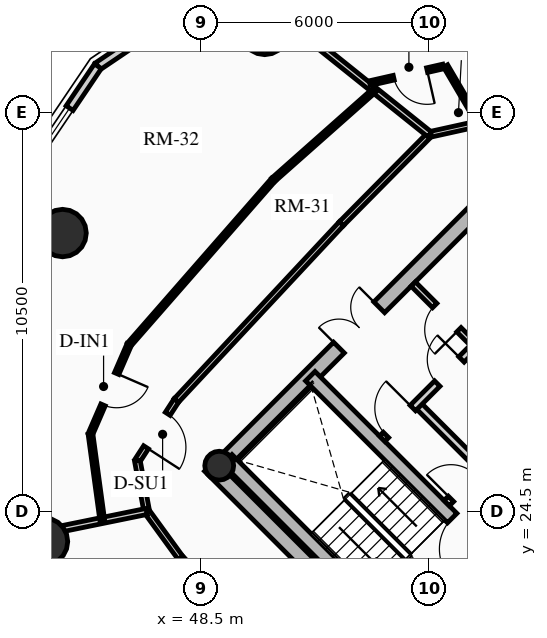
"""IFC4 building model, lengths in metres.
Left out: names, types, materials, properties, quantities, classifications, styles, units other than length and angle.
Written with IfcOpenShell. Run it as: python <this file> out.ifc"""

import sys

from ifc_helpers import new_model, si_unit, direction, frame, frame_2d, origin, origin_2d, place, context, subcontext, project, spatial, rectangle, circle, hollow_circle, extrude, source, transform, mapped, element, fill, save


model = new_model("IFC4")
c1 = context("Model", 3, precision=1e-05, world=origin(), true_north=direction((0.0, 1.0)))
c2 = subcontext(c1, "Body", "Model", "MODEL_VIEW")
j1 = project(units=[si_unit("LENGTHUNIT", "METRE"), si_unit("PLANEANGLEUNIT", "RADIAN")], contexts=[c1])
p1 = place(None, origin())
s1 = spatial("IfcSite", under=j1, at=p1, CompositionType="ELEMENT")
p2 = place(p1, origin())
s2 = spatial("IfcBuilding", under=s1, at=p2, CompositionType="ELEMENT")
p3 = place(p2, frame((0.0, 0.0, 174.88)))
s3 = spatial("IfcBuildingStorey", under=s2, at=p3, CompositionType="ELEMENT", Elevation=174.88)
p4 = place(p3, frame((58.702, 15.732, 0.0), z_axis=(0.0, 0.0, 1.0), x_axis=(-0.707106781187, 0.707106781187, 0.0)))
e1 = element("IfcWall", 1, at=p4, inside=s3, PredefinedType="SHEAR", context=c2, shape_type="SweptSolid", body=[
    extrude(rectangle(XDim=14.1, YDim=0.4, at=frame_2d((7.05, 0.0))), origin(), (0.0, 0.0, 1.0), 2.91),
])
p5 = place(p3, frame((48.873, 25.561, 0.0), z_axis=(0.0, 0.0, 1.0), x_axis=(0.707106781187, 0.707106781187, 0.0)))
e2 = element("IfcWall", 2, at=p5, inside=s3, PredefinedType="SHEAR", context=c2, shape_type="SweptSolid", body=[
    extrude(rectangle(XDim=10.7, YDim=0.4, at=frame_2d((5.35, 0.0))), origin(), (0.0, 0.0, 1.0), 2.91),
])
m1 = source(origin(), c2, "Body", "SweptSolid", [
    extrude(rectangle(XDim=1.5, YDim=2.02, at=frame_2d((0.75, 1.01))), frame((0.0, 0.21, 0.0), z_axis=(0.0, -1.0, 0.0), x_axis=(1.0, 0.0, 0.0)), (0.0, 0.0, 1.0), 0.42),
])
p6 = place(p5, frame((4.6, 0.0, 0.0)))
e3 = element("IfcOpeningElement", 3, at=p6, cuts=e2, PredefinedType="OPENING", context=c2, shape_type="MappedRepresentation", body=[
    mapped(m1, transform((0.0, 0.0, 0.0), x_axis=(1.0, 0.0, 0.0), y_axis=(0.0, 1.0, 0.0), z_axis=(0.0, 0.0, 1.0), scale=1.0)),
])
p7 = place(p3, frame((61.06, 18.373, 0.0), z_axis=(0.0, 0.0, 1.0), x_axis=(-0.707106781187, 0.707106781187, 0.0)))
e4 = element("IfcWall", 4, at=p7, inside=s3, PredefinedType="SHEAR", context=c2, shape_type="SweptSolid", body=[
    extrude(rectangle(XDim=13.7, YDim=0.35, at=frame_2d((6.85, 0.0))), origin(), (0.0, 0.0, 1.0), 2.91),
])
m2 = source(origin(), c2, "Body", "SweptSolid", [
    extrude(rectangle(XDim=1.1, YDim=2.015, at=frame_2d((0.55, 1.007))), frame((0.0, 0.185, 0.0), z_axis=(0.0, -1.0, 0.0), x_axis=(1.0, 0.0, 0.0)), (0.0, 0.0, 1.0), 0.37),
])
p8 = place(p7, frame((4.85, 0.0, 0.0)))
e5 = element("IfcOpeningElement", 5, at=p8, cuts=e4, PredefinedType="OPENING", context=c2, shape_type="MappedRepresentation", body=[
    mapped(m2, transform((0.0, 0.0, 0.0), x_axis=(1.0, 0.0, 0.0), y_axis=(0.0, 1.0, 0.0), z_axis=(0.0, 0.0, 1.0), scale=1.0)),
])
p9 = place(p7, frame((0.625, 0.0, 0.0)))
e6 = element("IfcOpeningElement", 6, at=p9, cuts=e4, PredefinedType="OPENING", context=c2, shape_type="MappedRepresentation", body=[
    mapped(m2, transform((0.0, 0.0, 0.0), x_axis=(1.0, 0.0, 0.0), y_axis=(0.0, 1.0, 0.0), z_axis=(0.0, 0.0, 1.0), scale=1.0)),
])
p10 = place(p7, frame((2.625, 0.0, 0.0)))
e7 = element("IfcOpeningElement", 7, at=p10, cuts=e4, PredefinedType="OPENING", context=c2, shape_type="MappedRepresentation", body=[
    mapped(m2, transform((0.0, 0.0, 0.0), x_axis=(1.0, 0.0, 0.0), y_axis=(0.0, 1.0, 0.0), z_axis=(0.0, 0.0, 1.0), scale=1.0)),
])
m3 = source(origin(), c2, "Body", "SweptSolid", [
    extrude(rectangle(XDim=1.15, YDim=2.02, at=frame_2d((0.575, 1.01))), frame((0.0, 0.185, 0.0), z_axis=(0.0, -1.0, 0.0), x_axis=(1.0, 0.0, 0.0)), (0.0, 0.0, 1.0), 0.37),
])
p11 = place(p7, frame((7.27, 0.0, 0.0)))
e8 = element("IfcOpeningElement", 8, at=p11, cuts=e4, PredefinedType="OPENING", context=c2, shape_type="MappedRepresentation", body=[
    mapped(m3, transform((0.0, 0.0, 0.0), x_axis=(1.0, 0.0, 0.0), y_axis=(0.0, 1.0, 0.0), z_axis=(0.0, 0.0, 1.0), scale=1.0)),
])
p12 = place(p3, frame((53.922, 21.141, 0.0), z_axis=(0.0, 0.0, 1.0), x_axis=(-0.707106781187, 0.707106781187, 0.0)))
e9 = element("IfcWall", 9, at=p12, inside=s3, PredefinedType="SHEAR", context=c2, shape_type="SweptSolid", body=[
    extrude(rectangle(XDim=6.695, YDim=0.35, at=frame_2d((3.348, 0.0))), origin(), (0.0, 0.0, 1.0), 2.91),
])
p13 = place(p3, frame((53.784, 21.003, 0.0), z_axis=(0.0, 0.0, 1.0), x_axis=(0.707106781187, 0.707106781187, 0.0)))
e10 = element("IfcWall", 10, at=p13, inside=s3, PredefinedType="SHEAR", context=c2, shape_type="SweptSolid", body=[
    extrude(rectangle(XDim=3.285, YDim=0.35, at=frame_2d((1.643, 0.0))), origin(), (0.0, 0.0, 1.0), 2.91),
])
p14 = place(p3, frame((48.976, 25.706, 0.0), z_axis=(0.0, 0.0, 1.0), x_axis=(0.707106781187, 0.707106781187, 0.0)))
e11 = element("IfcColumn", 11, at=p14, inside=s3, PredefinedType="COLUMN", context=c2, shape_type="SweptSolid", body=[
    extrude(hollow_circle(Radius=0.38, WallThickness=0.032, at=origin_2d()), origin(), (0.0, 0.0, 1.0), 2.91),
])
for number, where, z_axis, x_axis in (
    (12, (50.173, 37.146, 0.0), (0.0, 0.0, 1.0), (1.0, 0.0, 0.0)),
    (13, (44.854, 31.827, 0.0), (0.0, 0.0, 1.0), (1.0, 0.0, 0.0)),
    (14, (44.365, 23.709, 0.0), (0.0, 0.0, 1.0), (1.0, 0.0, 0.0)),
):
    element("IfcColumn", number, at=place(p3, frame(where, z_axis=z_axis, x_axis=x_axis)), inside=s3, PredefinedType="USERDEFINED", context=c2, shape_type="SweptSolid", body=[
        extrude(circle(Radius=0.625, at=origin_2d()), origin(), (0.0, 0.0, 1.0), 2.91),
    ])
p15 = place(p3, frame((45.783, 36.217, 0.0), z_axis=(0.0, 0.0, 1.0), x_axis=(0.828817439852, 0.55951912514, 0.0)))
e15 = element("IfcWall", 15, at=p15, inside=s3, PredefinedType="SOLIDWALL", context=c2, shape_type="SweptSolid", body=[
    extrude(rectangle(XDim=4.259, YDim=0.22, at=frame_2d((2.129, 0.0))), origin(), (0.0, 0.0, 1.0), 2.245),
])
p16 = place(p3, frame((43.4, 32.687, 0.0), z_axis=(0.0, 0.0, 1.0), x_axis=(0.55951912514, 0.828817439852, 0.0)))
e16 = element("IfcWall", 16, at=p16, inside=s3, PredefinedType="SOLIDWALL", context=c2, shape_type="SweptSolid", body=[
    extrude(rectangle(XDim=4.259, YDim=0.22, at=frame_2d((2.129, 0.0))), origin(), (0.0, 0.0, 1.0), 2.245),
])
m4 = source(origin(), c2, "Body", "SweptSolid", [
    extrude(rectangle(XDim=1.6, YDim=1.3, at=frame_2d((0.8, 0.65))), frame((0.0, 0.12, 0.0), z_axis=(0.0, -1.0, 0.0), x_axis=(1.0, 0.0, 0.0)), (0.0, 0.0, 1.0), 0.24),
])
p17 = place(p16, frame((1.33, 0.0, 0.65)))
e17 = element("IfcOpeningElement", 17, at=p17, cuts=e16, PredefinedType="OPENING", context=c2, shape_type="MappedRepresentation", body=[
    mapped(m4, transform((0.0, 0.0, 0.0), x_axis=(1.0, 0.0, 0.0), y_axis=(0.0, 1.0, 0.0), z_axis=(0.0, 0.0, 1.0), scale=1.0)),
])
p18 = place(p3, frame((44.78, 19.021, 0.0), z_axis=(0.0, 0.0, 1.0), x_axis=(-0.381196434348, 0.924494066201, 0.0)))
e18 = element("IfcWall", 18, at=p18, inside=s3, PredefinedType="SOLIDWALL", context=c2, shape_type="SweptSolid", body=[
    extrude(rectangle(XDim=5.003, YDim=0.22, at=frame_2d((2.501, 0.0))), origin(), (0.0, 0.0, 1.0), 2.245),
])
p19 = place(p18, frame((1.702, 0.0, 0.65)))
e19 = element("IfcOpeningElement", 19, at=p19, cuts=e18, PredefinedType="OPENING", context=c2, shape_type="MappedRepresentation", body=[
    mapped(m4, transform((0.0, 0.0, 0.0), x_axis=(1.0, 0.0, 0.0), y_axis=(0.0, 1.0, 0.0), z_axis=(0.0, 0.0, 1.0), scale=1.0)),
])
p20 = place(p3, frame((54.961, 24.719, 0.0), z_axis=(0.0, 0.0, 1.0), x_axis=(0.707106781187, 0.707106781187, 0.0)))
e20 = element("IfcWall", 20, at=p20, inside=s3, PredefinedType="PARTITIONING", context=c2, shape_type="SweptSolid", body=[
    extrude(rectangle(XDim=3.28, YDim=0.2, at=frame_2d((1.64, 0.0))), origin(), (0.0, 0.0, 1.0), 2.675),
])
m5 = source(origin(), c2, "Body", "SweptSolid", [
    extrude(rectangle(XDim=0.9, YDim=2.005, at=frame_2d((0.45, 1.002))), frame((0.0, 0.11, 0.0), z_axis=(0.0, -1.0, 0.0), x_axis=(1.0, 0.0, 0.0)), (0.0, 0.0, 1.0), 0.22),
])
p21 = place(p20, frame((0.16, 0.0, 0.0)))
e21 = element("IfcOpeningElement", 21, at=p21, cuts=e20, PredefinedType="OPENING", context=c2, shape_type="MappedRepresentation", body=[
    mapped(m5, transform((0.0, 0.0, 0.0), x_axis=(1.0, 0.0, 0.0), y_axis=(0.0, 1.0, 0.0), z_axis=(0.0, 0.0, 1.0), scale=1.0)),
])
p22 = place(p3, frame((55.874, 25.631, 0.0), z_axis=(0.0, 0.0, 1.0), x_axis=(-0.707157639372, 0.707055919343, 0.0)))
e22 = element("IfcWall", 22, at=p22, inside=s3, PredefinedType="PARTITIONING", context=c2, shape_type="SweptSolid", body=[
    extrude(rectangle(XDim=2.4, YDim=0.2, at=frame_2d((1.2, 0.0))), origin(), (0.0, 0.0, 1.0), 2.675),
])
p23 = place(p3, frame((53.264, 26.416, 0.0), z_axis=(0.0, 0.0, 1.0), x_axis=(0.707106781187, 0.707106781187, 0.0)))
e23 = element("IfcWall", 23, at=p23, inside=s3, PredefinedType="PARTITIONING", context=c2, shape_type="SweptSolid", body=[
    extrude(rectangle(XDim=3.28, YDim=0.2, at=frame_2d((1.64, 0.0))), origin(), (0.0, 0.0, 1.0), 2.675),
])
m6 = source(origin(), c2, "Body", "SweptSolid", [
    extrude(rectangle(XDim=1.0, YDim=2.015, at=frame_2d((0.5, 1.007))), frame((0.0, 0.11, 0.0), z_axis=(0.0, -1.0, 0.0), x_axis=(1.0, 0.0, 0.0)), (0.0, 0.0, 1.0), 0.22),
])
p24 = place(p23, frame((0.14, 0.0, 0.0)))
e24 = element("IfcOpeningElement", 24, at=p24, cuts=e23, PredefinedType="OPENING", context=c2, shape_type="MappedRepresentation", body=[
    mapped(m6, transform((0.0, 0.0, 0.0), x_axis=(1.0, 0.0, 0.0), y_axis=(0.0, 1.0, 0.0), z_axis=(0.0, 0.0, 1.0), scale=1.0)),
])
p25 = place(p23, frame((2.05, 0.0, 0.0)))
e25 = element("IfcOpeningElement", 25, at=p25, cuts=e23, PredefinedType="OPENING", context=c2, shape_type="MappedRepresentation", body=[
    mapped(m5, transform((0.0, 0.0, 0.0), x_axis=(1.0, 0.0, 0.0), y_axis=(0.0, 1.0, 0.0), z_axis=(0.0, 0.0, 1.0), scale=1.0)),
])
p26 = place(p3, frame((56.839, 27.728, 0.0), z_axis=(0.0, 0.0, 1.0), x_axis=(-0.707106781187, 0.707106781187, 0.0)))
e26 = element("IfcWall", 26, at=p26, inside=s3, PredefinedType="PARTITIONING", context=c2, shape_type="SweptSolid", body=[
    extrude(rectangle(XDim=3.9, YDim=0.16, at=frame_2d((1.95, 0.0))), origin(), (0.0, 0.0, 1.0), 2.675),
])
m7 = source(origin(), c2, "Body", "SweptSolid", [
    extrude(rectangle(XDim=0.9, YDim=2.005, at=frame_2d((0.45, 1.002))), frame((0.0, 0.09, 0.0), z_axis=(0.0, -1.0, 0.0), x_axis=(1.0, 0.0, 0.0)), (0.0, 0.0, 1.0), 0.18),
])
p27 = place(p26, frame((2.2, 0.0, 0.0)))
e27 = element("IfcOpeningElement", 27, at=p27, cuts=e26, PredefinedType="OPENING", context=c2, shape_type="MappedRepresentation", body=[
    mapped(m7, transform((0.0, 0.0, 0.0), x_axis=(1.0, 0.0, 0.0), y_axis=(0.0, 1.0, 0.0), z_axis=(0.0, 0.0, 1.0), scale=1.0)),
])
p28 = place(p3, frame((56.033, 34.757, 0.0), z_axis=(0.0, 0.0, 1.0), x_axis=(-0.976507263775, -0.215484486204, 0.0)))
e28 = element("IfcWall", 28, at=p28, inside=s3, PredefinedType="PARTITIONING", context=c2, shape_type="SweptSolid", body=[
    extrude(rectangle(XDim=1.556, YDim=0.15, at=frame_2d((0.778, 0.0))), origin(), (0.0, 0.0, 1.0), 2.245),
])
p29 = place(p3, frame((54.514, 34.422, 0.0), z_axis=(0.0, 0.0, 1.0), x_axis=(-0.703289573518, -0.710903492593, 0.0)))
e29 = element("IfcWall", 29, at=p29, inside=s3, PredefinedType="PARTITIONING", context=c2, shape_type="SweptSolid", body=[
    extrude(rectangle(XDim=3.303, YDim=0.15, at=frame_2d((1.651, 0.0))), origin(), (0.0, 0.0, 1.0), 2.245),
])
p30 = place(p3, frame((52.191, 32.074, 0.0), z_axis=(0.0, 0.0, 1.0), x_axis=(-0.682404362608, -0.730974887321, 0.0)))
e30 = element("IfcWall", 30, at=p30, inside=s3, PredefinedType="PARTITIONING", context=c2, shape_type="SweptSolid", body=[
    extrude(rectangle(XDim=6.364, YDim=0.15, at=frame_2d((3.182, 0.0))), origin(), (0.0, 0.0, 1.0), 2.245),
])
p31 = place(p3, frame((47.849, 27.423, 0.0), z_axis=(0.0, 0.0, 1.0), x_axis=(-0.543529808582, -0.839389866023, 0.0)))
e31 = element("IfcWall", 31, at=p31, inside=s3, PredefinedType="PARTITIONING", context=c2, shape_type="SweptSolid", body=[
    extrude(rectangle(XDim=1.89, YDim=0.15, at=frame_2d((0.945, 0.0))), origin(), (0.0, 0.0, 1.0), 2.245),
])
m8 = source(origin(), c2, "Body", "SweptSolid", [
    extrude(rectangle(XDim=1.05, YDim=2.015, at=frame_2d((0.525, 1.007))), frame((0.0, 0.085, 0.0), z_axis=(0.0, -1.0, 0.0), x_axis=(1.0, 0.0, 0.0)), (0.0, 0.0, 1.0), 0.17),
])
p32 = place(p31, frame((0.42, 0.0, 0.0)))
e32 = element("IfcOpeningElement", 32, at=p32, cuts=e31, PredefinedType="OPENING", context=c2, shape_type="MappedRepresentation", body=[
    mapped(m8, transform((0.0, 0.0, 0.0), x_axis=(1.0, 0.0, 0.0), y_axis=(0.0, 1.0, 0.0), z_axis=(0.0, 0.0, 1.0), scale=1.0)),
])
p33 = place(p3, frame((46.822, 25.836, 0.0), z_axis=(0.0, 0.0, 1.0), x_axis=(0.182115036249, -0.983277231289, 0.0)))
e33 = element("IfcWall", 33, at=p33, inside=s3, PredefinedType="PARTITIONING", context=c2, shape_type="SweptSolid", body=[
    extrude(rectangle(XDim=1.357, YDim=0.15, at=frame_2d((0.678, 0.0))), origin(), (0.0, 0.0, 1.0), 2.245),
])
p34 = place(p3, frame((47.069, 24.502, 0.0), z_axis=(0.0, 0.0, 1.0), x_axis=(0.587577436866, -0.809167940347, 0.0)))
e34 = element("IfcWall", 34, at=p34, inside=s3, PredefinedType="PARTITIONING", context=c2, shape_type="SweptSolid", body=[
    extrude(rectangle(XDim=1.515, YDim=0.15, at=frame_2d((0.757, 0.0))), origin(), (0.0, 0.0, 1.0), 2.245),
])
p35 = place(p3, frame((47.959, 23.277, 0.0), z_axis=(0.0, 0.0, 1.0), x_axis=(0.696422573496, -0.717631938479, 0.0)))
e35 = element("IfcWall", 35, at=p35, inside=s3, PredefinedType="PARTITIONING", context=c2, shape_type="SweptSolid", body=[
    extrude(rectangle(XDim=5.882, YDim=0.15, at=frame_2d((2.941, 0.0))), origin(), (0.0, 0.0, 1.0), 2.675),
])
m9 = source(origin(), c2, "Body", "SweptSolid", [
    extrude(rectangle(XDim=1.0, YDim=2.015, at=frame_2d((0.5, 1.007))), frame((0.0, 0.085, 0.0), z_axis=(0.0, -1.0, 0.0), x_axis=(1.0, 0.0, 0.0)), (0.0, 0.0, 1.0), 0.17),
])
p36 = place(p35, frame((2.441, 0.0, 0.0)))
e36 = element("IfcOpeningElement", 36, at=p36, cuts=e35, PredefinedType="OPENING", context=c2, shape_type="MappedRepresentation", body=[
    mapped(m9, transform((0.0, 0.0, 0.0), x_axis=(1.0, 0.0, 0.0), y_axis=(0.0, 1.0, 0.0), z_axis=(0.0, 0.0, 1.0), scale=1.0)),
])
p37 = place(p3, frame((54.514, 34.422, 0.0), z_axis=(0.0, 0.0, 1.0), x_axis=(-0.780385234796, 0.625299036712, 0.0)))
e37 = element("IfcWall", 37, at=p37, inside=s3, PredefinedType="PARTITIONING", context=c2, shape_type="SweptSolid", body=[
    extrude(rectangle(XDim=6.653, YDim=0.16, at=frame_2d((3.326, 0.0))), origin(), (0.0, 0.0, 1.0), 2.245),
])
p38 = place(p3, frame((47.069, 24.502, 0.0), z_axis=(0.0, 0.0, 1.0), x_axis=(-0.979772902724, -0.200112616012, 0.0)))
e38 = element("IfcWall", 38, at=p38, inside=s3, PredefinedType="PARTITIONING", context=c2, shape_type="SweptSolid", body=[
    extrude(rectangle(XDim=4.263, YDim=0.16, at=frame_2d((2.131, 0.0))), origin(), (0.0, 0.0, 1.0), 2.245),
])
p39 = place(p3, frame((55.737, 34.853, 0.0), z_axis=(0.0, 0.0, 1.0), x_axis=(-0.506282425857, 0.862367732043, 0.0)))
e39 = element("IfcWall", 39, at=p39, inside=s3, PredefinedType="PARTITIONING", context=c2, shape_type="SweptSolid", body=[
    extrude(rectangle(XDim=1.591, YDim=0.125, at=frame_2d((0.796, 0.0))), origin(), (0.0, 0.0, 1.0), 2.245),
])
p40 = place(p3, frame((54.871, 36.211, 0.0), z_axis=(0.0, 0.0, 1.0), x_axis=(-0.975212623293, -0.221269833846, 0.0)))
e40 = element("IfcWall", 40, at=p40, inside=s3, PredefinedType="PARTITIONING", context=c2, shape_type="SweptSolid", body=[
    extrude(rectangle(XDim=1.983, YDim=0.125, at=frame_2d((0.991, 0.0))), origin(), (0.0, 0.0, 1.0), 2.312),
])
m10 = source(origin(), c2, "Body", "SweptSolid", [
    extrude(rectangle(XDim=0.9, YDim=2.005, at=frame_2d((0.45, 1.002))), frame((0.0, 0.073, 0.0), z_axis=(0.0, -1.0, 0.0), x_axis=(1.0, 0.0, 0.0)), (0.0, 0.0, 1.0), 0.145),
])
p41 = place(p40, frame((0.436, 0.0, 0.0)))
e41 = element("IfcOpeningElement", 41, at=p41, cuts=e40, PredefinedType="OPENING", context=c2, shape_type="MappedRepresentation", body=[
    mapped(m10, transform((0.0, 0.0, 0.0), x_axis=(1.0, 0.0, 0.0), y_axis=(0.0, 1.0, 0.0), z_axis=(0.0, 0.0, 1.0), scale=1.0)),
])
p42 = place(p3, frame((53.06, 35.587, 0.0), z_axis=(0.0, 0.0, 1.0), x_axis=(-0.748390346028, -0.663258539314, 0.0)))
e42 = element("IfcWall", 42, at=p42, inside=s3, PredefinedType="PARTITIONING", context=c2, shape_type="SweptSolid", body=[
    extrude(rectangle(XDim=3.553, YDim=0.125, at=frame_2d((1.777, 0.0))), origin(), (0.0, 0.0, 1.0), 2.245),
])
p43 = place(p3, frame((50.401, 33.23, 0.0), z_axis=(0.0, 0.0, 1.0), x_axis=(-0.658387591096, -0.752679068322, 0.0)))
e43 = element("IfcWall", 43, at=p43, inside=s3, PredefinedType="PARTITIONING", context=c2, shape_type="SweptSolid", body=[
    extrude(rectangle(XDim=5.761, YDim=0.125, at=frame_2d((2.88, 0.0))), origin(), (0.0, 0.0, 1.0), 2.245),
])
p44 = place(p3, frame((46.608, 28.894, 0.0), z_axis=(0.0, 0.0, 1.0), x_axis=(-0.397650183672, -0.917537100844, 0.0)))
e44 = element("IfcWall", 44, at=p44, inside=s3, PredefinedType="PARTITIONING", context=c2, shape_type="SweptSolid", body=[
    extrude(rectangle(XDim=2.564, YDim=0.125, at=frame_2d((1.282, 0.0))), origin(), (0.0, 0.0, 1.0), 2.245),
])
p45 = place(p44, frame((0.832, 0.0, 0.0)))
e45 = element("IfcOpeningElement", 45, at=p45, cuts=e44, PredefinedType="OPENING", context=c2, shape_type="MappedRepresentation", body=[
    mapped(m10, transform((0.0, 0.0, 0.0), x_axis=(1.0, 0.0, 0.0), y_axis=(0.0, 1.0, 0.0), z_axis=(0.0, 0.0, 1.0), scale=1.0)),
])
p46 = place(p3, frame((45.588, 26.541, 0.0), z_axis=(0.0, 0.0, 1.0), x_axis=(0.135321759641, -0.990801706381, 0.0)))
e46 = element("IfcWall", 46, at=p46, inside=s3, PredefinedType="PARTITIONING", context=c2, shape_type="SweptSolid", body=[
    extrude(rectangle(XDim=2.299, YDim=0.125, at=frame_2d((1.149, 0.0))), origin(), (0.0, 0.0, 1.0), 2.245),
])
m11 = source(origin(), c2, "Body", "SweptSolid", [
    extrude(rectangle(XDim=1.6, YDim=1.3, at=frame_2d((0.8, 0.65))), frame((0.0, 0.03, 0.0), z_axis=(0.0, -1.0, 0.0), x_axis=(1.0, 0.0, 0.0)), (0.0, 0.0, 1.0), 0.06),
])
p47 = place(p17, origin())
e47 = element("IfcWindow", 47, at=p47, inside=s3, PartitioningType="SINGLE_PANEL", PredefinedType="WINDOW", context=c2, shape_type="MappedRepresentation", body=[
    mapped(m11, transform((0.0, 0.0, 0.0), x_axis=(1.0, 0.0, 0.0), y_axis=(0.0, 1.0, 0.0), z_axis=(0.0, 0.0, 1.0), scale=1.0)),
])
fill(e17, e47)
m12 = source(origin(), c2, "Body", "SweptSolid", [
    extrude(rectangle(XDim=1.15, YDim=2.02, at=frame_2d((0.575, 1.01))), frame((0.0, 0.025, 0.0), z_axis=(0.0, -1.0, 0.0), x_axis=(1.0, 0.0, 0.0)), (0.0, 0.0, 1.0), 0.05),
])
p48 = place(p11, origin())
e48 = element("IfcDoor", 48, at=p48, inside=s3, OperationType="SINGLE_SWING_LEFT", PredefinedType="DOOR", context=c2, shape_type="MappedRepresentation", body=[
    mapped(m12, transform((0.0, 0.0, 0.0), x_axis=(1.0, 0.0, 0.0), y_axis=(0.0, 1.0, 0.0), z_axis=(0.0, 0.0, 1.0), scale=1.0)),
])
fill(e8, e48)
m13 = source(origin(), c2, "Body", "SweptSolid", [
    extrude(rectangle(XDim=1.5, YDim=2.02, at=frame_2d((0.75, 1.01))), frame((0.0, 0.025, 0.0), z_axis=(0.0, -1.0, 0.0), x_axis=(1.0, 0.0, 0.0)), (0.0, 0.0, 1.0), 0.05),
])
p49 = place(p6, origin())
e49 = element("IfcDoor", 49, at=p49, inside=s3, OperationType="DOUBLE_DOOR_SINGLE_SWING", PredefinedType="DOOR", context=c2, shape_type="MappedRepresentation", body=[
    mapped(m13, transform((0.0, 0.0, 0.0), x_axis=(1.0, 0.0, 0.0), y_axis=(0.0, 1.0, 0.0), z_axis=(0.0, 0.0, 1.0), scale=1.0)),
])
fill(e3, e49)
m14 = source(origin(), c2, "Body", "SweptSolid", [
    extrude(rectangle(XDim=0.9, YDim=2.005, at=frame_2d((0.45, 1.002))), frame((0.0, 0.025, 0.0), z_axis=(0.0, -1.0, 0.0), x_axis=(1.0, 0.0, 0.0)), (0.0, 0.0, 1.0), 0.05),
])
p50 = place(p21, origin())
e50 = element("IfcDoor", 50, at=p50, inside=s3, OperationType="SINGLE_SWING_LEFT", PredefinedType="DOOR", context=c2, shape_type="MappedRepresentation", body=[
    mapped(m14, transform((0.0, 0.0, 0.0), x_axis=(1.0, 0.0, 0.0), y_axis=(0.0, 1.0, 0.0), z_axis=(0.0, 0.0, 1.0), scale=1.0)),
])
fill(e21, e50)
m15 = source(origin(), c2, "Body", "SweptSolid", [
    extrude(rectangle(XDim=1.0, YDim=2.015, at=frame_2d((0.5, 1.007))), frame((0.0, 0.025, 0.0), z_axis=(0.0, -1.0, 0.0), x_axis=(1.0, 0.0, 0.0)), (0.0, 0.0, 1.0), 0.05),
])
p51 = place(p24, origin())
e51 = element("IfcDoor", 51, at=p51, inside=s3, OperationType="SINGLE_SWING_RIGHT", PredefinedType="DOOR", context=c2, shape_type="MappedRepresentation", body=[
    mapped(m15, transform((0.0, 0.0, 0.0), x_axis=(1.0, 0.0, 0.0), y_axis=(0.0, 1.0, 0.0), z_axis=(0.0, 0.0, 1.0), scale=1.0)),
])
fill(e24, e51)
p52 = place(p25, origin())
e52 = element("IfcDoor", 52, at=p52, inside=s3, OperationType="SINGLE_SWING_RIGHT", PredefinedType="DOOR", context=c2, shape_type="MappedRepresentation", body=[
    mapped(m14, transform((0.0, 0.0, 0.0), x_axis=(1.0, 0.0, 0.0), y_axis=(0.0, 1.0, 0.0), z_axis=(0.0, 0.0, 1.0), scale=1.0)),
])
fill(e25, e52)
p53 = place(p27, origin())
e53 = element("IfcDoor", 53, at=p53, inside=s3, OperationType="SINGLE_SWING_LEFT", PredefinedType="DOOR", context=c2, shape_type="MappedRepresentation", body=[
    mapped(m14, transform((0.0, 0.0, 0.0), x_axis=(1.0, 0.0, 0.0), y_axis=(0.0, 1.0, 0.0), z_axis=(0.0, 0.0, 1.0), scale=1.0)),
])
fill(e27, e53)
p54 = place(p41, origin())
e54 = element("IfcDoor", 54, at=p54, inside=s3, OperationType="SINGLE_SWING_LEFT", PredefinedType="DOOR", context=c2, shape_type="MappedRepresentation", body=[
    mapped(m14, transform((0.0, 0.0, 0.0), x_axis=(1.0, 0.0, 0.0), y_axis=(0.0, 1.0, 0.0), z_axis=(0.0, 0.0, 1.0), scale=1.0)),
])
fill(e41, e54)
m16 = source(origin(), c2, "Body", "SweptSolid", [
    extrude(rectangle(XDim=1.05, YDim=2.015, at=frame_2d((0.525, 1.007))), frame((0.0, 0.025, 0.0), z_axis=(0.0, -1.0, 0.0), x_axis=(1.0, 0.0, 0.0)), (0.0, 0.0, 1.0), 0.05),
])
p55 = place(p32, origin())
e55 = element("IfcDoor", 55, at=p55, inside=s3, OperationType="SINGLE_SWING_RIGHT", PredefinedType="DOOR", context=c2, shape_type="MappedRepresentation", body=[
    mapped(m16, transform((0.0, 0.0, 0.0), x_axis=(1.0, 0.0, 0.0), y_axis=(0.0, 1.0, 0.0), z_axis=(0.0, 0.0, 1.0), scale=1.0)),
])
fill(e32, e55)
p56 = place(p45, origin())
e56 = element("IfcDoor", 56, at=p56, inside=s3, OperationType="SINGLE_SWING_LEFT", PredefinedType="DOOR", context=c2, shape_type="MappedRepresentation", body=[
    mapped(m14, transform((0.0, 0.0, 0.0), x_axis=(1.0, 0.0, 0.0), y_axis=(0.0, 1.0, 0.0), z_axis=(0.0, 0.0, 1.0), scale=1.0)),
])
fill(e45, e56)
save(model, sys.argv[1])
